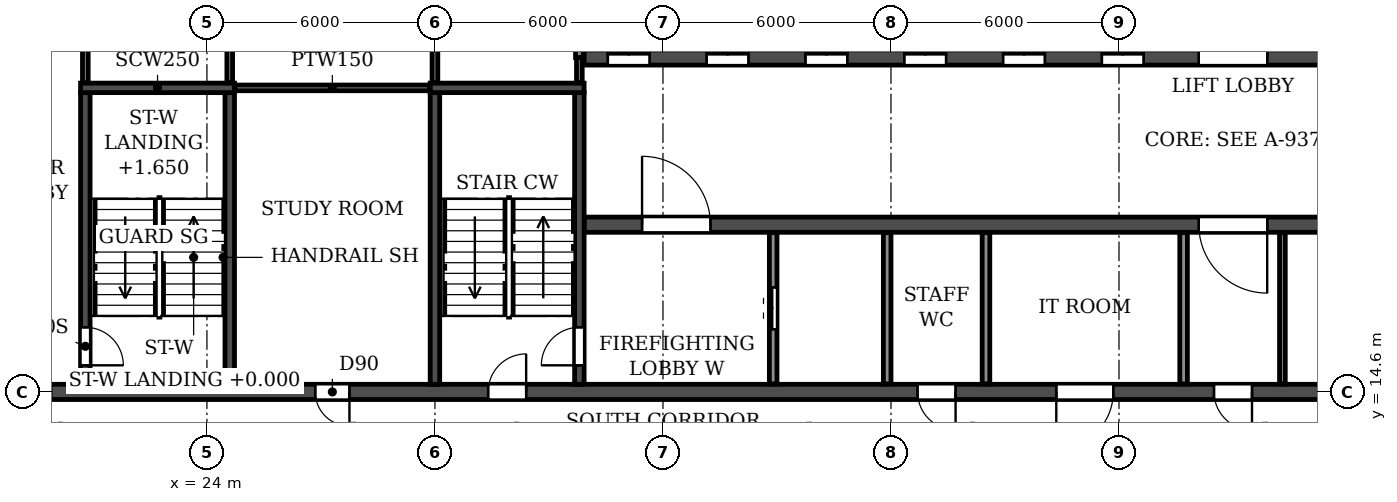
"""IFC4 building model, lengths in metres.
Left out: names, types, materials, properties, quantities, classifications, styles, units other than length and angle.
Written with IfcOpenShell. Run it as: python <this file> out.ifc"""

import sys

from ifc_helpers import new_model, si_unit, direction, frame, frame_2d, origin, place, context, subcontext, project, spatial, rectangle, extrude, element, fill, save


model = new_model("IFC4")
c1 = context("Model", 3, precision=1e-05, world=origin(), true_north=direction((0.0, 1.0)))
c2 = subcontext(c1, "Body", "Model", "MODEL_VIEW")
j1 = project(units=[si_unit("LENGTHUNIT", "METRE"), si_unit("PLANEANGLEUNIT", "RADIAN")], contexts=[c1])
p1 = place(None, origin())
s1 = spatial("IfcSite", under=j1, at=p1, CompositionType="ELEMENT")
p2 = place(p1, origin())
s2 = spatial("IfcBuilding", under=s1, at=p2, CompositionType="ELEMENT")
p3 = place(p2, frame((0.0, 0.0, 211.5)))
s3 = spatial("IfcBuildingStorey", under=s2, at=p3, CompositionType="ELEMENT", Elevation=211.5)
p4 = place(p3, frame((18.2, 14.6, 0.0), z_axis=(0.0, 0.0, 1.0), x_axis=(1.0, 0.0, 0.0)))
e1 = element("IfcWall", 1, at=p4, inside=s3, PredefinedType="SOLIDWALL", context=c2, shape_type="SweptSolid", body=[
    extrude(rectangle(XDim=65.6, YDim=0.4, at=frame_2d((32.8, 0.0))), origin(), (0.0, 0.0, 1.0), 2.95),
])
p5 = place(p4, frame((0.7, 0.0, 0.0)))
e2 = element("IfcOpeningElement", 2, at=p5, cuts=e1, PredefinedType="OPENING", context=c2, shape_type="SweptSolid", body=[
    extrude(rectangle(XDim=1.0, YDim=2.1, at=frame_2d((0.5, 1.05))), frame((0.0, 0.21, 0.0), z_axis=(0.0, -1.0, 0.0), x_axis=(1.0, 0.0, 0.0)), (0.0, 0.0, 1.0), 0.42),
])
p6 = place(p4, frame((8.65, 0.0, 0.0)))
e3 = element("IfcOpeningElement", 3, at=p6, cuts=e1, PredefinedType="OPENING", context=c2, shape_type="SweptSolid", body=[
    extrude(rectangle(XDim=0.9, YDim=2.1, at=frame_2d((0.45, 1.05))), frame((0.0, 0.21, 0.0), z_axis=(0.0, -1.0, 0.0), x_axis=(1.0, 0.0, 0.0)), (0.0, 0.0, 1.0), 0.42),
])
p7 = place(p4, frame((13.2, 0.0, 0.0)))
e4 = element("IfcOpeningElement", 4, at=p7, cuts=e1, PredefinedType="OPENING", context=c2, shape_type="SweptSolid", body=[
    extrude(rectangle(XDim=1.0, YDim=2.1, at=frame_2d((0.5, 1.05))), frame((0.0, 0.21, 0.0), z_axis=(0.0, -1.0, 0.0), x_axis=(1.0, 0.0, 0.0)), (0.0, 0.0, 1.0), 0.42),
])
p8 = place(p4, frame((24.5, 0.0, 0.0)))
e5 = element("IfcOpeningElement", 5, at=p8, cuts=e1, PredefinedType="OPENING", context=c2, shape_type="SweptSolid", body=[
    extrude(rectangle(XDim=1.0, YDim=2.1, at=frame_2d((0.5, 1.05))), frame((0.0, 0.21, 0.0), z_axis=(0.0, -1.0, 0.0), x_axis=(1.0, 0.0, 0.0)), (0.0, 0.0, 1.0), 0.42),
])
p9 = place(p4, frame((28.15, 0.0, 0.0)))
e6 = element("IfcOpeningElement", 6, at=p9, cuts=e1, PredefinedType="OPENING", context=c2, shape_type="SweptSolid", body=[
    extrude(rectangle(XDim=1.5, YDim=2.1, at=frame_2d((0.75, 1.05))), frame((0.0, 0.21, 0.0), z_axis=(0.0, -1.0, 0.0), x_axis=(1.0, 0.0, 0.0)), (0.0, 0.0, 1.0), 0.42),
])
p10 = place(p4, frame((32.3, 0.0, 0.0)))
e7 = element("IfcOpeningElement", 7, at=p10, cuts=e1, PredefinedType="OPENING", context=c2, shape_type="SweptSolid", body=[
    extrude(rectangle(XDim=1.0, YDim=2.1, at=frame_2d((0.5, 1.05))), frame((0.0, 0.21, 0.0), z_axis=(0.0, -1.0, 0.0), x_axis=(1.0, 0.0, 0.0)), (0.0, 0.0, 1.0), 0.42),
])
p11 = place(p4, frame((37.5, 0.0, 0.0)))
e8 = element("IfcOpeningElement", 8, at=p11, cuts=e1, PredefinedType="OPENING", context=c2, shape_type="SweptSolid", body=[
    extrude(rectangle(XDim=1.0, YDim=2.1, at=frame_2d((0.5, 1.05))), frame((0.0, 0.21, 0.0), z_axis=(0.0, -1.0, 0.0), x_axis=(1.0, 0.0, 0.0)), (0.0, 0.0, 1.0), 0.42),
])
p12 = place(p4, frame((51.4, 0.0, 0.0)))
e9 = element("IfcOpeningElement", 9, at=p12, cuts=e1, PredefinedType="OPENING", context=c2, shape_type="SweptSolid", body=[
    extrude(rectangle(XDim=1.0, YDim=2.1, at=frame_2d((0.5, 1.05))), frame((0.0, 0.21, 0.0), z_axis=(0.0, -1.0, 0.0), x_axis=(1.0, 0.0, 0.0)), (0.0, 0.0, 1.0), 0.42),
])
p13 = place(p4, frame((56.05, 0.0, 0.0)))
e10 = element("IfcOpeningElement", 10, at=p13, cuts=e1, PredefinedType="OPENING", context=c2, shape_type="SweptSolid", body=[
    extrude(rectangle(XDim=0.9, YDim=2.1, at=frame_2d((0.45, 1.05))), frame((0.0, 0.21, 0.0), z_axis=(0.0, -1.0, 0.0), x_axis=(1.0, 0.0, 0.0)), (0.0, 0.0, 1.0), 0.42),
])
p14 = place(p4, frame((63.9, 0.0, 0.0)))
e11 = element("IfcOpeningElement", 11, at=p14, cuts=e1, PredefinedType="OPENING", context=c2, shape_type="SweptSolid", body=[
    extrude(rectangle(XDim=1.0, YDim=2.1, at=frame_2d((0.5, 1.05))), frame((0.0, 0.21, 0.0), z_axis=(0.0, -1.0, 0.0), x_axis=(1.0, 0.0, 0.0)), (0.0, 0.0, 1.0), 0.42),
])
p15 = place(p3, frame((33.925, 19.0, 0.0), z_axis=(0.0, 0.0, 1.0), x_axis=(1.0, 0.0, 0.0)))
e12 = element("IfcWall", 12, at=p15, inside=s3, PredefinedType="SOLIDWALL", context=c2, shape_type="SweptSolid", body=[
    extrude(rectangle(XDim=34.15, YDim=0.4, at=frame_2d((17.075, 0.0))), origin(), (0.0, 0.0, 1.0), 2.95),
])
p16 = place(p15, frame((16.175, 0.0, 0.0)))
e13 = element("IfcOpeningElement", 13, at=p16, cuts=e12, PredefinedType="OPENING", context=c2, shape_type="SweptSolid", body=[
    extrude(rectangle(XDim=1.8, YDim=2.1, at=frame_2d((0.9, 1.05))), frame((0.0, 0.21, 0.0), z_axis=(0.0, -1.0, 0.0), x_axis=(1.0, 0.0, 0.0)), (0.0, 0.0, 1.0), 0.42),
])
p17 = place(p15, frame((1.525, 0.0, 0.0)))
e14 = element("IfcOpeningElement", 14, at=p17, cuts=e12, PredefinedType="OPENING", context=c2, shape_type="SweptSolid", body=[
    extrude(rectangle(XDim=1.8, YDim=2.1, at=frame_2d((0.9, 1.05))), frame((0.0, 0.21, 0.0), z_axis=(0.0, -1.0, 0.0), x_axis=(1.0, 0.0, 0.0)), (0.0, 0.0, 1.0), 0.42),
])
p18 = place(p15, frame((30.825, 0.0, 0.0)))
e15 = element("IfcOpeningElement", 15, at=p18, cuts=e12, PredefinedType="OPENING", context=c2, shape_type="SweptSolid", body=[
    extrude(rectangle(XDim=1.8, YDim=2.1, at=frame_2d((0.9, 1.05))), frame((0.0, 0.21, 0.0), z_axis=(0.0, -1.0, 0.0), x_axis=(1.0, 0.0, 0.0)), (0.0, 0.0, 1.0), 0.42),
])
p19 = place(p3, frame((33.925, 23.4, 0.0), z_axis=(0.0, 0.0, 1.0), x_axis=(1.0, 0.0, 0.0)))
e16 = element("IfcWall", 16, at=p19, inside=s3, PredefinedType="SOLIDWALL", context=c2, shape_type="SweptSolid", body=[
    extrude(rectangle(XDim=34.15, YDim=0.4, at=frame_2d((17.075, 0.0))), origin(), (0.0, 0.0, 1.0), 2.95),
])
p20 = place(p19, frame((16.175, 0.0, 0.0)))
e17 = element("IfcOpeningElement", 17, at=p20, cuts=e16, PredefinedType="OPENING", context=c2, shape_type="SweptSolid", body=[
    extrude(rectangle(XDim=1.8, YDim=2.1, at=frame_2d((0.9, 1.05))), frame((0.0, 0.21, 0.0), z_axis=(0.0, -1.0, 0.0), x_axis=(1.0, 0.0, 0.0)), (0.0, 0.0, 1.0), 0.42),
])
p21 = place(p19, frame((0.625, 0.0, 0.0)))
e18 = element("IfcOpeningElement", 18, at=p21, cuts=e16, PredefinedType="OPENING", context=c2, shape_type="SweptSolid", body=[
    extrude(rectangle(XDim=1.1, YDim=2.1, at=frame_2d((0.55, 1.05))), frame((0.0, 0.21, 0.0), z_axis=(0.0, -1.0, 0.0), x_axis=(1.0, 0.0, 0.0)), (0.0, 0.0, 1.0), 0.42),
])
p22 = place(p19, frame((3.225, 0.0, 0.0)))
e19 = element("IfcOpeningElement", 19, at=p22, cuts=e16, PredefinedType="OPENING", context=c2, shape_type="SweptSolid", body=[
    extrude(rectangle(XDim=1.1, YDim=2.1, at=frame_2d((0.55, 1.05))), frame((0.0, 0.21, 0.0), z_axis=(0.0, -1.0, 0.0), x_axis=(1.0, 0.0, 0.0)), (0.0, 0.0, 1.0), 0.42),
])
p23 = place(p19, frame((5.825, 0.0, 0.0)))
e20 = element("IfcOpeningElement", 20, at=p23, cuts=e16, PredefinedType="OPENING", context=c2, shape_type="SweptSolid", body=[
    extrude(rectangle(XDim=1.1, YDim=2.1, at=frame_2d((0.55, 1.05))), frame((0.0, 0.21, 0.0), z_axis=(0.0, -1.0, 0.0), x_axis=(1.0, 0.0, 0.0)), (0.0, 0.0, 1.0), 0.42),
])
p24 = place(p19, frame((8.425, 0.0, 0.0)))
e21 = element("IfcOpeningElement", 21, at=p24, cuts=e16, PredefinedType="OPENING", context=c2, shape_type="SweptSolid", body=[
    extrude(rectangle(XDim=1.1, YDim=2.1, at=frame_2d((0.55, 1.05))), frame((0.0, 0.21, 0.0), z_axis=(0.0, -1.0, 0.0), x_axis=(1.0, 0.0, 0.0)), (0.0, 0.0, 1.0), 0.42),
])
p25 = place(p19, frame((11.025, 0.0, 0.0)))
e22 = element("IfcOpeningElement", 22, at=p25, cuts=e16, PredefinedType="OPENING", context=c2, shape_type="SweptSolid", body=[
    extrude(rectangle(XDim=1.1, YDim=2.1, at=frame_2d((0.55, 1.05))), frame((0.0, 0.21, 0.0), z_axis=(0.0, -1.0, 0.0), x_axis=(1.0, 0.0, 0.0)), (0.0, 0.0, 1.0), 0.42),
])
p26 = place(p19, frame((13.625, 0.0, 0.0)))
e23 = element("IfcOpeningElement", 23, at=p26, cuts=e16, PredefinedType="OPENING", context=c2, shape_type="SweptSolid", body=[
    extrude(rectangle(XDim=1.1, YDim=2.1, at=frame_2d((0.55, 1.05))), frame((0.0, 0.21, 0.0), z_axis=(0.0, -1.0, 0.0), x_axis=(1.0, 0.0, 0.0)), (0.0, 0.0, 1.0), 0.42),
])
p27 = place(p19, frame((27.225, 0.0, 0.0)))
e24 = element("IfcOpeningElement", 24, at=p27, cuts=e16, PredefinedType="OPENING", context=c2, shape_type="SweptSolid", body=[
    extrude(rectangle(XDim=1.1, YDim=2.1, at=frame_2d((0.55, 1.05))), frame((0.0, 0.21, 0.0), z_axis=(0.0, -1.0, 0.0), x_axis=(1.0, 0.0, 0.0)), (0.0, 0.0, 1.0), 0.42),
])
p28 = place(p3, frame((30.0, 14.8, 0.0), z_axis=(0.0, 0.0, 1.0), x_axis=(0.0, 1.0, 0.0)))
e25 = element("IfcWall", 25, at=p28, inside=s3, PredefinedType="SOLIDWALL", context=c2, shape_type="SweptSolid", body=[
    extrude(rectangle(XDim=7.675, YDim=0.25, at=frame_2d((3.837, 0.0))), origin(), (0.0, 0.0, 1.0), 2.95),
])
p29 = place(p3, frame((33.8, 14.8, 0.0), z_axis=(0.0, 0.0, 1.0), x_axis=(0.0, 1.0, 0.0)))
e26 = element("IfcWall", 26, at=p29, inside=s3, PredefinedType="SOLIDWALL", context=c2, shape_type="SweptSolid", body=[
    extrude(rectangle(XDim=7.675, YDim=0.25, at=frame_2d((3.837, 0.0))), origin(), (0.0, 0.0, 1.0), 2.95),
])
p30 = place(p29, frame((0.5, 0.0, 0.0)))
e27 = element("IfcOpeningElement", 27, at=p30, cuts=e26, PredefinedType="OPENING", context=c2, shape_type="SweptSolid", body=[
    extrude(rectangle(XDim=1.0, YDim=2.1, at=frame_2d((0.5, 1.05))), frame((0.0, 0.135, 0.0), z_axis=(0.0, -1.0, 0.0), x_axis=(1.0, 0.0, 0.0)), (0.0, 0.0, 1.0), 0.27),
])
p31 = place(p3, frame((29.875, 22.6, 0.0), z_axis=(0.0, 0.0, 1.0), x_axis=(1.0, 0.0, 0.0)))
e28 = element("IfcWall", 28, at=p31, inside=s3, PredefinedType="SOLIDWALL", context=c2, shape_type="SweptSolid", body=[
    extrude(rectangle(XDim=4.05, YDim=0.25, at=frame_2d((2.025, 0.0))), origin(), (0.0, 0.0, 1.0), 2.95),
])
p32 = place(p3, frame((20.8, 14.8, 0.0), z_axis=(0.0, 0.0, 1.0), x_axis=(0.0, 1.0, 0.0)))
e29 = element("IfcWall", 29, at=p32, inside=s3, PredefinedType="SOLIDWALL", context=c2, shape_type="SweptSolid", body=[
    extrude(rectangle(XDim=7.675, YDim=0.25, at=frame_2d((3.837, 0.0))), origin(), (0.0, 0.0, 1.0), 2.95),
])
p33 = place(p32, frame((0.5, 0.0, 0.0)))
e30 = element("IfcOpeningElement", 30, at=p33, cuts=e29, PredefinedType="OPENING", context=c2, shape_type="SweptSolid", body=[
    extrude(rectangle(XDim=1.0, YDim=2.1, at=frame_2d((0.5, 1.05))), frame((0.0, 0.135, 0.0), z_axis=(0.0, -1.0, 0.0), x_axis=(1.0, 0.0, 0.0)), (0.0, 0.0, 1.0), 0.27),
])
p34 = place(p3, frame((24.6, 14.8, 0.0), z_axis=(0.0, 0.0, 1.0), x_axis=(0.0, 1.0, 0.0)))
e31 = element("IfcWall", 31, at=p34, inside=s3, PredefinedType="SOLIDWALL", context=c2, shape_type="SweptSolid", body=[
    extrude(rectangle(XDim=7.675, YDim=0.25, at=frame_2d((3.837, 0.0))), origin(), (0.0, 0.0, 1.0), 2.95),
])
p35 = place(p3, frame((20.675, 22.6, 0.0), z_axis=(0.0, 0.0, 1.0), x_axis=(1.0, 0.0, 0.0)))
e32 = element("IfcWall", 32, at=p35, inside=s3, PredefinedType="SOLIDWALL", context=c2, shape_type="SweptSolid", body=[
    extrude(rectangle(XDim=4.05, YDim=0.25, at=frame_2d((2.025, 0.0))), origin(), (0.0, 0.0, 1.0), 2.95),
])
p36 = place(p3, frame((52.3, 14.81, 0.0), z_axis=(0.0, 0.0, 1.0), x_axis=(0.0, 1.0, 0.0)))
e33 = element("IfcWall", 33, at=p36, inside=s3, PredefinedType="PARTITIONING", context=c2, shape_type="SweptSolid", body=[
    extrude(rectangle(XDim=3.98, YDim=0.15, at=frame_2d((1.99, 0.0))), origin(), (0.0, 0.0, 1.0), 2.95),
])
p37 = place(p3, frame((24.735, 22.6, 0.0), z_axis=(0.0, 0.0, 1.0), x_axis=(1.0, 0.0, 0.0)))
e34 = element("IfcWall", 34, at=p37, inside=s3, PredefinedType="PARTITIONING", context=c2, shape_type="SweptSolid", body=[
    extrude(rectangle(XDim=5.13, YDim=0.15, at=frame_2d((2.565, 0.0))), origin(), (0.0, 0.0, 1.0), 2.95),
])
for number, where, z_axis, x_axis in (
    (35, (44.5, 14.81, 0.0), (0.0, 0.0, 1.0), (0.0, 1.0, 0.0)),
    (36, (49.7, 14.81, 0.0), (0.0, 0.0, 1.0), (0.0, 1.0, 0.0)),
):
    element("IfcWall", number, at=place(p3, frame(where, z_axis=z_axis, x_axis=x_axis)), inside=s3, PredefinedType="PARTITIONING", context=c2, shape_type="SweptSolid", body=[
        extrude(rectangle(XDim=3.98, YDim=0.2, at=frame_2d((1.99, 0.0))), origin(), (0.0, 0.0, 1.0), 2.95),
    ])
for number, where, z_axis, x_axis in (
    (37, (20.8, 22.735, 0.0), (0.0, 0.0, 1.0), (0.0, 1.0, 0.0)),
    (38, (24.6, 22.735, 0.0), (0.0, 0.0, 1.0), (0.0, 1.0, 0.0)),
    (39, (30.0, 22.735, 0.0), (0.0, 0.0, 1.0), (0.0, 1.0, 0.0)),
):
    element("IfcWall", number, at=place(p3, frame(where, z_axis=z_axis, x_axis=x_axis)), inside=s3, PredefinedType="PARTITIONING", context=c2, shape_type="SweptSolid", body=[
        extrude(rectangle(XDim=4.855, YDim=0.15, at=frame_2d((2.427, 0.0))), origin(), (0.0, 0.0, 1.0), 2.95),
    ])
p38 = place(p3, frame((33.8, 22.735, 0.0), z_axis=(0.0, 0.0, 1.0), x_axis=(0.0, 1.0, 0.0)))
e40 = element("IfcWall", 40, at=p38, inside=s3, PredefinedType="PARTITIONING", context=c2, shape_type="SweptSolid", body=[
    extrude(rectangle(XDim=0.665, YDim=0.15, at=frame_2d((0.333, 0.0))), origin(), (0.0, 0.0, 1.0), 2.95),
])
p39 = place(p3, frame((33.8, 23.4, 0.0), z_axis=(0.0, 0.0, 1.0), x_axis=(0.0, 1.0, 0.0)))
e41 = element("IfcWall", 41, at=p39, inside=s3, PredefinedType="PARTITIONING", context=c2, shape_type="SweptSolid", body=[
    extrude(rectangle(XDim=2.7, YDim=0.2, at=frame_2d((1.35, 0.0))), origin(), (0.0, 0.0, 1.0), 2.95),
])
p40 = place(p3, frame((38.9, 14.81, 0.0), z_axis=(0.0, 0.0, 1.0), x_axis=(0.0, 1.0, 0.0)))
e42 = element("IfcWall", 42, at=p40, inside=s3, PredefinedType="PARTITIONING", context=c2, shape_type="SweptSolid", body=[
    extrude(rectangle(XDim=3.98, YDim=0.2, at=frame_2d((1.99, 0.0))), origin(), (0.0, 0.0, 1.0), 2.95),
])
p41 = place(p40, frame((1.44, 0.0, 0.0)))
e43 = element("IfcOpeningElement", 43, at=p41, cuts=e42, PredefinedType="OPENING", context=c2, shape_type="SweptSolid", body=[
    extrude(rectangle(XDim=1.1, YDim=2.1, at=frame_2d((0.55, 1.05))), frame((0.0, 0.11, 0.0), z_axis=(0.0, -1.0, 0.0), x_axis=(1.0, 0.0, 0.0)), (0.0, 0.0, 1.0), 0.22),
])
p42 = place(p3, frame((41.9, 14.81, 0.0), z_axis=(0.0, 0.0, 1.0), x_axis=(0.0, 1.0, 0.0)))
e44 = element("IfcWall", 44, at=p42, inside=s3, PredefinedType="PARTITIONING", context=c2, shape_type="SweptSolid", body=[
    extrude(rectangle(XDim=3.98, YDim=0.2, at=frame_2d((1.99, 0.0))), origin(), (0.0, 0.0, 1.0), 2.95),
])
p43 = place(p6, frame((0.9, 0.0, 0.0), z_axis=(0.0, 0.0, 1.0), x_axis=(-1.0, 0.0, 0.0)))
e45 = element("IfcDoor", 45, at=p43, inside=s3, OperationType="SINGLE_SWING_LEFT", PredefinedType="DOOR", context=c2, shape_type="SweptSolid", body=[
    extrude(rectangle(XDim=0.9, YDim=2.1, at=frame_2d((0.45, 1.05))), frame((0.0, 0.025, 0.0), z_axis=(0.0, -1.0, 0.0), x_axis=(1.0, 0.0, 0.0)), (0.0, 0.0, 1.0), 0.05),
])
fill(e3, e45)
p44 = place(p7, origin())
e46 = element("IfcDoor", 46, at=p44, inside=s3, OperationType="SINGLE_SWING_RIGHT", PredefinedType="DOOR", context=c2, shape_type="SweptSolid", body=[
    extrude(rectangle(XDim=1.0, YDim=2.1, at=frame_2d((0.5, 1.05))), frame((0.0, 0.025, 0.0), z_axis=(0.0, -1.0, 0.0), x_axis=(1.0, 0.0, 0.0)), (0.0, 0.0, 1.0), 0.05),
])
fill(e4, e46)
p45 = place(p8, frame((1.0, 0.0, 0.0), z_axis=(0.0, 0.0, 1.0), x_axis=(-1.0, 0.0, 0.0)))
e47 = element("IfcDoor", 47, at=p45, inside=s3, OperationType="SINGLE_SWING_LEFT", PredefinedType="DOOR", context=c2, shape_type="SweptSolid", body=[
    extrude(rectangle(XDim=1.0, YDim=2.1, at=frame_2d((0.5, 1.05))), frame((0.0, 0.025, 0.0), z_axis=(0.0, -1.0, 0.0), x_axis=(1.0, 0.0, 0.0)), (0.0, 0.0, 1.0), 0.05),
])
fill(e5, e47)
p46 = place(p9, frame((1.5, 0.0, 0.0), z_axis=(0.0, 0.0, 1.0), x_axis=(-1.0, 0.0, 0.0)))
e48 = element("IfcDoor", 48, at=p46, inside=s3, OperationType="DOUBLE_DOOR_SINGLE_SWING", PredefinedType="DOOR", context=c2, shape_type="SweptSolid", body=[
    extrude(rectangle(XDim=1.5, YDim=2.1, at=frame_2d((0.75, 1.05))), frame((0.0, 0.025, 0.0), z_axis=(0.0, -1.0, 0.0), x_axis=(1.0, 0.0, 0.0)), (0.0, 0.0, 1.0), 0.05),
])
fill(e6, e48)
p47 = place(p10, frame((1.0, 0.0, 0.0), z_axis=(0.0, 0.0, 1.0), x_axis=(-1.0, 0.0, 0.0)))
e49 = element("IfcDoor", 49, at=p47, inside=s3, OperationType="SINGLE_SWING_LEFT", PredefinedType="DOOR", context=c2, shape_type="SweptSolid", body=[
    extrude(rectangle(XDim=1.0, YDim=2.1, at=frame_2d((0.5, 1.05))), frame((0.0, 0.025, 0.0), z_axis=(0.0, -1.0, 0.0), x_axis=(1.0, 0.0, 0.0)), (0.0, 0.0, 1.0), 0.05),
])
fill(e7, e49)
p48 = place(p30, origin())
e50 = element("IfcDoor", 50, at=p48, inside=s3, OperationType="SINGLE_SWING_LEFT", PredefinedType="DOOR", context=c2, shape_type="SweptSolid", body=[
    extrude(rectangle(XDim=1.0, YDim=2.1, at=frame_2d((0.5, 1.05))), frame((0.0, 0.025, 0.0), z_axis=(0.0, -1.0, 0.0), x_axis=(1.0, 0.0, 0.0)), (0.0, 0.0, 1.0), 0.05),
])
fill(e27, e50)
p49 = place(p41, origin())
e51 = element("IfcDoor", 51, at=p49, inside=s3, OperationType="DOUBLE_DOOR_SLIDING", PredefinedType="DOOR", context=c2, shape_type="SweptSolid", body=[
    extrude(rectangle(XDim=1.1, YDim=2.1, at=frame_2d((0.55, 1.05))), frame((0.0, 0.025, 0.0), z_axis=(0.0, -1.0, 0.0), x_axis=(1.0, 0.0, 0.0)), (0.0, 0.0, 1.0), 0.05),
])
fill(e43, e51)
p50 = place(p20, origin())
e52 = element("IfcDoor", 52, at=p50, inside=s3, OperationType="DOUBLE_DOOR_SINGLE_SWING", PredefinedType="DOOR", context=c2, shape_type="SweptSolid", body=[
    extrude(rectangle(XDim=1.8, YDim=2.1, at=frame_2d((0.9, 1.05))), frame((0.0, 0.025, 0.0), z_axis=(0.0, -1.0, 0.0), x_axis=(1.0, 0.0, 0.0)), (0.0, 0.0, 1.0), 0.05),
])
fill(e17, e52)
p51 = place(p16, frame((1.8, 0.0, 0.0), z_axis=(0.0, 0.0, 1.0), x_axis=(-1.0, 0.0, 0.0)))
e53 = element("IfcDoor", 53, at=p51, inside=s3, OperationType="DOUBLE_DOOR_SINGLE_SWING", PredefinedType="DOOR", context=c2, shape_type="SweptSolid", body=[
    extrude(rectangle(XDim=1.8, YDim=2.1, at=frame_2d((0.9, 1.05))), frame((0.0, 0.025, 0.0), z_axis=(0.0, -1.0, 0.0), x_axis=(1.0, 0.0, 0.0)), (0.0, 0.0, 1.0), 0.05),
])
fill(e13, e53)
p52 = place(p21, origin())
e54 = element("IfcDoor", 54, at=p52, inside=s3, OperationType="DOUBLE_DOOR_SLIDING", PredefinedType="DOOR", context=c2, shape_type="SweptSolid", body=[
    extrude(rectangle(XDim=1.1, YDim=2.1, at=frame_2d((0.55, 1.05))), frame((0.0, 0.025, 0.0), z_axis=(0.0, -1.0, 0.0), x_axis=(1.0, 0.0, 0.0)), (0.0, 0.0, 1.0), 0.05),
])
fill(e18, e54)
p53 = place(p17, origin())
e55 = element("IfcDoor", 55, at=p53, inside=s3, OperationType="DOUBLE_DOOR_SINGLE_SWING", PredefinedType="DOOR", context=c2, shape_type="SweptSolid", body=[
    extrude(rectangle(XDim=1.8, YDim=2.1, at=frame_2d((0.9, 1.05))), frame((0.0, 0.025, 0.0), z_axis=(0.0, -1.0, 0.0), x_axis=(1.0, 0.0, 0.0)), (0.0, 0.0, 1.0), 0.05),
])
fill(e14, e55)
p54 = place(p22, origin())
e56 = element("IfcDoor", 56, at=p54, inside=s3, OperationType="DOUBLE_DOOR_SLIDING", PredefinedType="DOOR", context=c2, shape_type="SweptSolid", body=[
    extrude(rectangle(XDim=1.1, YDim=2.1, at=frame_2d((0.55, 1.05))), frame((0.0, 0.025, 0.0), z_axis=(0.0, -1.0, 0.0), x_axis=(1.0, 0.0, 0.0)), (0.0, 0.0, 1.0), 0.05),
])
fill(e19, e56)
p55 = place(p23, origin())
e57 = element("IfcDoor", 57, at=p55, inside=s3, OperationType="DOUBLE_DOOR_SLIDING", PredefinedType="DOOR", context=c2, shape_type="SweptSolid", body=[
    extrude(rectangle(XDim=1.1, YDim=2.1, at=frame_2d((0.55, 1.05))), frame((0.0, 0.025, 0.0), z_axis=(0.0, -1.0, 0.0), x_axis=(1.0, 0.0, 0.0)), (0.0, 0.0, 1.0), 0.05),
])
fill(e20, e57)
p56 = place(p24, origin())
e58 = element("IfcDoor", 58, at=p56, inside=s3, OperationType="DOUBLE_DOOR_SLIDING", PredefinedType="DOOR", context=c2, shape_type="SweptSolid", body=[
    extrude(rectangle(XDim=1.1, YDim=2.1, at=frame_2d((0.55, 1.05))), frame((0.0, 0.025, 0.0), z_axis=(0.0, -1.0, 0.0), x_axis=(1.0, 0.0, 0.0)), (0.0, 0.0, 1.0), 0.05),
])
fill(e21, e58)
p57 = place(p25, origin())
e59 = element("IfcDoor", 59, at=p57, inside=s3, OperationType="DOUBLE_DOOR_SLIDING", PredefinedType="DOOR", context=c2, shape_type="SweptSolid", body=[
    extrude(rectangle(XDim=1.1, YDim=2.1, at=frame_2d((0.55, 1.05))), frame((0.0, 0.025, 0.0), z_axis=(0.0, -1.0, 0.0), x_axis=(1.0, 0.0, 0.0)), (0.0, 0.0, 1.0), 0.05),
])
fill(e22, e59)
p58 = place(p26, origin())
e60 = element("IfcDoor", 60, at=p58, inside=s3, OperationType="DOUBLE_DOOR_SLIDING", PredefinedType="DOOR", context=c2, shape_type="SweptSolid", body=[
    extrude(rectangle(XDim=1.1, YDim=2.1, at=frame_2d((0.55, 1.05))), frame((0.0, 0.025, 0.0), z_axis=(0.0, -1.0, 0.0), x_axis=(1.0, 0.0, 0.0)), (0.0, 0.0, 1.0), 0.05),
])
fill(e23, e60)
p59 = place(p33, frame((1.0, 0.0, 0.0), z_axis=(0.0, 0.0, 1.0), x_axis=(-1.0, 0.0, 0.0)))
e61 = element("IfcDoor", 61, at=p59, inside=s3, OperationType="SINGLE_SWING_RIGHT", PredefinedType="DOOR", context=c2, shape_type="SweptSolid", body=[
    extrude(rectangle(XDim=1.0, YDim=2.1, at=frame_2d((0.5, 1.05))), frame((0.0, 0.025, 0.0), z_axis=(0.0, -1.0, 0.0), x_axis=(1.0, 0.0, 0.0)), (0.0, 0.0, 1.0), 0.05),
])
fill(e30, e61)
save(model, sys.argv[1])
